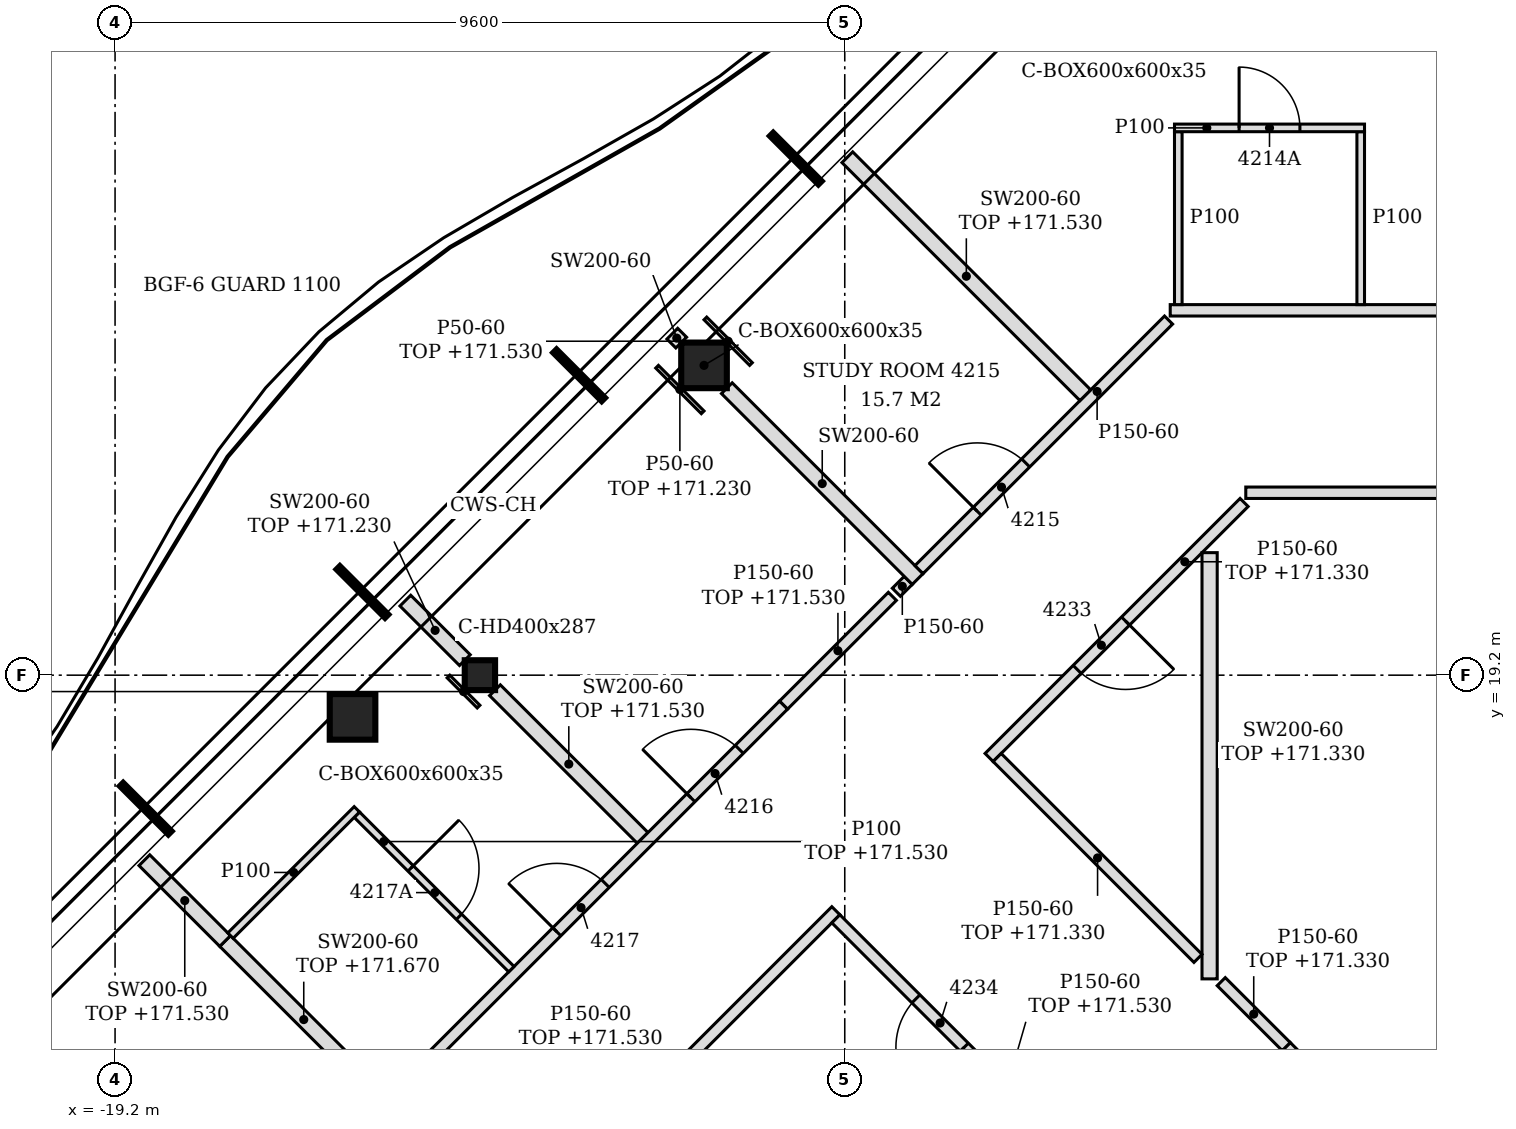
"""IFC4 building model, lengths in metres.
Left out: names, types, materials, properties, quantities, classifications, styles, units other than length and angle.
Written with IfcOpenShell. Run it as: python <this file> out.ifc"""

import sys

from ifc_helpers import new_model, si_unit, direction, frame, frame_2d, origin, origin_2d, place, context, subcontext, project, spatial, polyline, rectangle, hollow_rectangle, i_section, outline, extrude, clip, halfspace, element, fill, save


model = new_model("IFC4")
c1 = context("Model", 3, precision=1e-05, world=origin(), true_north=direction((0.0, 1.0)))
c2 = subcontext(c1, "Body", "Model", "MODEL_VIEW")
j1 = project(units=[si_unit("LENGTHUNIT", "METRE"), si_unit("PLANEANGLEUNIT", "RADIAN")], contexts=[c1])
p1 = place(None, origin())
s1 = spatial("IfcSite", under=j1, at=p1, CompositionType="ELEMENT")
p2 = place(p1, origin())
s2 = spatial("IfcBuilding", under=s1, at=p2, CompositionType="ELEMENT")
p3 = place(p2, frame((0.0, 0.0, 168.6)))
s3 = spatial("IfcBuildingStorey", under=s2, at=p3, CompositionType="ELEMENT", Elevation=168.6)
for number, where, z_axis, x_axis in (
    (1, (-11.451, 23.276, -0.15), (0.0, 0.0, 1.0), (1.0, 0.0, 0.0)),
    (2, (-16.076, 18.652, -0.15), (0.0, 0.0, 1.0), (1.0, 0.0, 0.0)),
):
    element("IfcColumn", number, at=place(p3, frame(where, z_axis=z_axis, x_axis=x_axis)), inside=s3, PredefinedType="COLUMN", context=c2, shape_type="Clipping", body=[
        clip(extrude(hollow_rectangle(XDim=0.6, YDim=0.6, WallThickness=0.035, at=origin_2d()), origin(), (0.0, 0.0, 1.0), 3.6), halfspace(frame((0.0, 0.0, 3.589), z_axis=(0.0, 0.0, 1.0), x_axis=(1.0, 0.0, 0.0)), False)),
    ])
p4 = place(p3, frame((-14.4, 19.2, -0.15), z_axis=(0.0, 0.0, 1.0), x_axis=(1.0, 0.0, 0.0)))
e3 = element("IfcColumn", 3, at=p4, inside=s3, PredefinedType="COLUMN", context=c2, shape_type="SweptSolid", body=[
    extrude(i_section(OverallWidth=0.399, OverallDepth=0.393, WebThickness=0.023, FlangeThickness=0.037, FilletRadius=0.015, at=origin_2d()), origin(), (0.0, 0.0, 1.0), 3.6),
])
p5 = place(p3, frame((-14.475, 11.343, 0.0), z_axis=(0.0, 0.0, 1.0), x_axis=(0.707124921665, 0.707088640243, 0.0)))
e4 = element("IfcWall", 4, at=p5, inside=s3, PredefinedType="PARTITIONING", context=c2, shape_type="SweptSolid", body=[
    extrude(rectangle(XDim=6.729, YDim=0.15, at=frame_2d((3.365, 0.0))), origin(), (0.0, 0.0, 1.0), 2.93),
])
p6 = place(p3, frame((-16.875, 12.337, 0.0), z_axis=(0.0, 0.0, 1.0), x_axis=(0.707106781187, 0.707106781187, 0.0)))
e5 = element("IfcWall", 5, at=p6, inside=s3, PredefinedType="PARTITIONING", context=c2, shape_type="SweptSolid", body=[
    extrude(rectangle(XDim=9.148, YDim=0.15, at=frame_2d((4.574, 0.0))), origin(), (0.0, 0.0, 1.0), 2.93),
])
p7 = place(p6, frame((7.426, 0.0, 0.0)))
e6 = element("IfcOpeningElement", 6, at=p7, cuts=e5, PredefinedType="OPENING", context=c2, shape_type="SweptSolid", body=[
    extrude(rectangle(XDim=0.9, YDim=2.1, at=frame_2d((0.45, 1.05))), frame((0.0, 0.085, 0.0), z_axis=(0.0, -1.0, 0.0), x_axis=(1.0, 0.0, 0.0)), (0.0, 0.0, 1.0), 0.17),
])
p8 = place(p6, frame((4.932, 0.0, 0.0)))
e7 = element("IfcOpeningElement", 7, at=p8, cuts=e5, PredefinedType="OPENING", context=c2, shape_type="SweptSolid", body=[
    extrude(rectangle(XDim=0.9, YDim=2.1, at=frame_2d((0.45, 1.05))), frame((0.0, 0.085, 0.0), z_axis=(0.0, -1.0, 0.0), x_axis=(1.0, 0.0, 0.0)), (0.0, 0.0, 1.0), 0.17),
])
p9 = place(p3, frame((-6.921, 13.2, 0.0), z_axis=(0.0, 0.0, 1.0), x_axis=(-0.707230271715, 0.706983269088, 0.0)))
e8 = element("IfcWall", 8, at=p9, inside=s3, PredefinedType="PARTITIONING", context=c2, shape_type="SweptSolid", body=[
    extrude(rectangle(XDim=3.954, YDim=0.15, at=frame_2d((1.977, 0.0))), origin(), (0.0, 0.0, 1.0), 2.93),
])
p10 = place(p9, frame((1.564, 0.0, 0.0)))
e9 = element("IfcOpeningElement", 9, at=p10, cuts=e8, PredefinedType="OPENING", context=c2, shape_type="SweptSolid", body=[
    extrude(rectangle(XDim=0.9, YDim=2.1, at=frame_2d((0.45, 1.05))), frame((0.0, 0.085, 0.0), z_axis=(0.0, -1.0, 0.0), x_axis=(1.0, 0.0, 0.0)), (0.0, 0.0, 1.0), 0.17),
])
p11 = place(p3, frame((-4.602, 13.398, 0.0), z_axis=(0.0, 0.0, 1.0), x_axis=(0.707106781187, 0.707106781187, 0.0)))
e10 = element("IfcWall", 10, at=p11, inside=s3, PredefinedType="PARTITIONING", context=c2, shape_type="SweptSolid", body=[
    extrude(rectangle(XDim=1.296, YDim=0.15, at=frame_2d((0.648, 0.0))), origin(), (0.0, 0.0, 1.0), 3.45),
])
p12 = place(p3, frame((-15.683, 13.635, 0.0), z_axis=(0.0, 0.0, 1.0), x_axis=(-0.707273689425, 0.706939833541, 0.0)))
e11 = element("IfcWall", 11, at=p12, inside=s3, PredefinedType="PARTITIONING", context=c2, shape_type="SweptSolid", body=[
    extrude(rectangle(XDim=2.925, YDim=0.2, at=frame_2d((1.462, 0.0))), origin(), (0.0, 0.0, 1.0), 3.07),
])
p13 = place(p3, frame((-3.792, 14.314, 0.0), z_axis=(0.0, 0.0, 1.0), x_axis=(-0.707409718716, 0.706803713817, 0.0)))
e12 = element("IfcWall", 12, at=p13, inside=s3, PredefinedType="PARTITIONING", context=c2, shape_type="SweptSolid", body=[
    extrude(rectangle(XDim=1.208, YDim=0.15, at=frame_2d((0.604, 0.0))), origin(), (0.0, 0.0, 1.0), 2.73),
])
p14 = place(p3, frame((-4.8, 15.205, 0.0), z_axis=(0.0, 0.0, 1.0), x_axis=(0.0, 1.0, 0.0)))
e13 = element("IfcWall", 13, at=p14, inside=s3, PredefinedType="PARTITIONING", context=c2, shape_type="SweptSolid", body=[
    extrude(rectangle(XDim=5.607, YDim=0.2, at=frame_2d((2.804, 0.0))), origin(), (0.0, 0.0, 1.0), 2.73),
])
p15 = place(p3, frame((-13.986, 15.332, 0.0), z_axis=(0.0, 0.0, 1.0), x_axis=(-0.707106781187, 0.707106781187, 0.0)))
e14 = element("IfcWall", 14, at=p15, inside=s3, PredefinedType="PARTITIONING", context=c2, shape_type="SweptSolid", body=[
    extrude(rectangle(XDim=2.874, YDim=0.1, at=frame_2d((1.437, 0.0))), origin(), (0.0, 0.0, 1.0), 2.93),
])
p16 = place(p15, frame((0.975, 0.0, 0.0)))
e15 = element("IfcOpeningElement", 15, at=p16, cuts=e14, PredefinedType="OPENING", context=c2, shape_type="SweptSolid", body=[
    extrude(rectangle(XDim=0.9, YDim=2.1, at=frame_2d((0.45, 1.05))), frame((0.0, 0.06, 0.0), z_axis=(0.0, -1.0, 0.0), x_axis=(1.0, 0.0, 0.0)), (0.0, 0.0, 1.0), 0.12),
])
p17 = place(p3, frame((-4.953, 15.474, 0.0), z_axis=(0.0, 0.0, 1.0), x_axis=(-0.707008778354, 0.707204770438, 0.0)))
e16 = element("IfcWall", 16, at=p17, inside=s3, PredefinedType="PARTITIONING", context=c2, shape_type="SweptSolid", body=[
    extrude(rectangle(XDim=3.737, YDim=0.15, at=frame_2d((1.869, 0.0))), origin(), (0.0, 0.0, 1.0), 2.73),
])
p18 = place(p3, frame((-17.752, 15.703, 0.0), z_axis=(0.0, 0.0, 1.0), x_axis=(-0.706863049337, 0.707350429054, 0.0)))
e17 = element("IfcWall", 17, at=p18, inside=s3, PredefinedType="PARTITIONING", context=c2, shape_type="SweptSolid", body=[
    extrude(rectangle(XDim=1.503, YDim=0.2, at=frame_2d((0.751, 0.0))), origin(), (0.0, 0.0, 1.0), 2.93),
])
p19 = place(p3, frame((-17.681, 15.774, 0.0), z_axis=(0.0, 0.0, 1.0), x_axis=(0.707314478862, 0.706899022487, 0.0)))
e18 = element("IfcWall", 18, at=p19, inside=s3, PredefinedType="PARTITIONING", context=c2, shape_type="SweptSolid", body=[
    extrude(rectangle(XDim=2.351, YDim=0.1, at=frame_2d((1.175, 0.0))), origin(), (0.0, 0.0, 1.0), 3.45),
])
p20 = place(p3, frame((-12.259, 17.059, 0.0), z_axis=(0.0, 0.0, 1.0), x_axis=(-0.707106781187, 0.707106781187, 0.0)))
e19 = element("IfcWall", 19, at=p20, inside=s3, PredefinedType="PARTITIONING", context=c2, shape_type="SweptSolid", body=[
    extrude(rectangle(XDim=2.748, YDim=0.2, at=frame_2d((1.374, 0.0))), origin(), (0.0, 0.0, 1.0), 2.93),
])
p21 = place(p3, frame((-7.701, 18.117, 0.0), z_axis=(0.0, 0.0, 1.0), x_axis=(0.707106781187, 0.707106781187, 0.0)))
e20 = element("IfcWall", 20, at=p21, inside=s3, PredefinedType="PARTITIONING", context=c2, shape_type="SweptSolid", body=[
    extrude(rectangle(XDim=4.745, YDim=0.15, at=frame_2d((2.372, 0.0))), origin(), (0.0, 0.0, 1.0), 2.73),
])
p22 = place(p21, frame((1.639, 0.0, 0.0)))
e21 = element("IfcOpeningElement", 21, at=p22, cuts=e20, PredefinedType="OPENING", context=c2, shape_type="SweptSolid", body=[
    extrude(rectangle(XDim=0.9, YDim=2.1, at=frame_2d((0.45, 1.05))), frame((0.0, 0.085, 0.0), z_axis=(0.0, -1.0, 0.0), x_axis=(1.0, 0.0, 0.0)), (0.0, 0.0, 1.0), 0.17),
])
p23 = place(p3, frame((-10.406, 18.806, 0.0), z_axis=(0.0, 0.0, 1.0), x_axis=(0.707408152147, 0.706805281726, 0.0)))
e22 = element("IfcWall", 22, at=p23, inside=s3, PredefinedType="PARTITIONING", context=c2, shape_type="SweptSolid", body=[
    extrude(rectangle(XDim=2.025, YDim=0.15, at=frame_2d((1.012, 0.0))), origin(), (0.0, 0.0, 1.0), 2.93),
])
p24 = place(p3, frame((-14.598, 19.398, 0.0), z_axis=(0.0, 0.0, 1.0), x_axis=(-0.707106781187, 0.707106781187, 0.0)))
e23 = element("IfcWall", 23, at=p24, inside=s3, PredefinedType="PARTITIONING", context=c2, shape_type="SweptSolid", body=[
    extrude(rectangle(XDim=1.107, YDim=0.2, at=frame_2d((0.554, 0.0))), origin(), (0.0, 0.0, 1.0), 2.63),
])
p25 = place(p3, frame((-8.921, 20.291, 0.0), z_axis=(0.0, 0.0, 1.0), x_axis=(0.706555431121, 0.707657701684, 0.0)))
e24 = element("IfcWall", 24, at=p25, inside=s3, PredefinedType="PARTITIONING", context=c2, shape_type="SweptSolid", body=[
    extrude(rectangle(XDim=0.221, YDim=0.15, at=frame_2d((0.111, 0.0))), origin(), (0.0, 0.0, 1.0), 3.45),
])
p26 = place(p3, frame((-8.641, 20.465, 0.0), z_axis=(0.0, 0.0, 1.0), x_axis=(-0.707106781187, 0.707106781187, 0.0)))
e25 = element("IfcWall", 25, at=p26, inside=s3, PredefinedType="PARTITIONING", context=c2, shape_type="SweptSolid", body=[
    extrude(rectangle(XDim=3.55, YDim=0.2, at=frame_2d((1.775, 0.0))), origin(), (0.0, 0.0, 1.0), 3.45),
])
p27 = place(p3, frame((-8.623, 20.589, 0.0), z_axis=(0.0, 0.0, 1.0), x_axis=(0.707106781187, 0.707106781187, 0.0)))
e26 = element("IfcWall", 26, at=p27, inside=s3, PredefinedType="PARTITIONING", context=c2, shape_type="SweptSolid", body=[
    extrude(rectangle(XDim=4.643, YDim=0.15, at=frame_2d((2.322, 0.0))), origin(), (0.0, 0.0, 1.0), 3.45),
])
p28 = place(p27, frame((1.085, 0.0, 0.0)))
e27 = element("IfcOpeningElement", 27, at=p28, cuts=e26, PredefinedType="OPENING", context=c2, shape_type="SweptSolid", body=[
    extrude(rectangle(XDim=0.9, YDim=2.1, at=frame_2d((0.45, 1.05))), frame((0.0, 0.085, 0.0), z_axis=(0.0, -1.0, 0.0), x_axis=(1.0, 0.0, 0.0)), (0.0, 0.0, 1.0), 0.17),
])
p29 = place(p3, frame((-4.324, 21.6, 0.0), z_axis=(0.0, 0.0, 1.0), x_axis=(1.0, 0.0, 0.0)))
e28 = element("IfcWall", 28, at=p29, inside=s3, PredefinedType="PARTITIONING", context=c2, shape_type="SweptSolid", body=[
    extrude(rectangle(XDim=9.199, YDim=0.15, at=frame_2d((4.6, 0.0))), origin(), (0.0, 0.0, 1.0), 3.45),
])
p30 = place(p3, frame((-6.435, 22.883, 0.0), z_axis=(0.0, 0.0, 1.0), x_axis=(-0.707106781187, 0.707106781187, 0.0)))
e29 = element("IfcWall", 29, at=p30, inside=s3, PredefinedType="PARTITIONING", context=c2, shape_type="SweptSolid", body=[
    extrude(rectangle(XDim=4.428, YDim=0.2, at=frame_2d((2.214, 0.0))), origin(), (0.0, 0.0, 1.0), 2.93),
])
p31 = place(p3, frame((-11.752, 23.576, 0.0), z_axis=(0.0, 0.0, 1.0), x_axis=(-0.707106781187, 0.707106781187, 0.0)))
e30 = element("IfcWall", 30, at=p31, inside=s3, PredefinedType="PARTITIONING", context=c2, shape_type="SweptSolid", body=[
    extrude(rectangle(XDim=0.166, YDim=0.2, at=frame_2d((0.083, 0.0))), origin(), (0.0, 0.0, 1.0), 3.45),
])
p32 = place(p3, frame((-5.318, 24.0, 0.0), z_axis=(0.0, 0.0, 1.0), x_axis=(1.0, 0.0, 0.0)))
e31 = element("IfcWall", 31, at=p32, inside=s3, PredefinedType="PARTITIONING", context=c2, shape_type="SweptSolid", body=[
    extrude(outline(polyline([(0.0, 0.0), (25.036, 0.0), (25.036, 2.88), (24.668, 2.88), (24.666, 2.73), (24.368, 2.73), (24.366, 2.88), (12.668, 2.88), (12.666, 2.73), (12.368, 2.73), (12.366, 2.88), (0.668, 2.88), (0.666, 2.73), (0.368, 2.73), (0.366, 2.88), (0.0, 2.88), (0.0, 0.0)])), frame((0.0, 0.075, 0.0), z_axis=(0.0, -1.0, 0.0), x_axis=(1.0, 0.0, 0.0)), (0.0, 0.0, 1.0), 0.15),
])
p33 = place(p32, frame((21.812, 0.0, 0.0)))
e32 = element("IfcOpeningElement", 32, at=p33, cuts=e31, PredefinedType="OPENING", context=c2, shape_type="SweptSolid", body=[
    extrude(rectangle(XDim=0.9, YDim=2.1, at=frame_2d((0.45, 1.05))), frame((0.0, 0.085, 0.0), z_axis=(0.0, -1.0, 0.0), x_axis=(1.0, 0.0, 0.0)), (0.0, 0.0, 1.0), 0.17),
])
p34 = place(p32, frame((13.268, 0.0, 0.0)))
e33 = element("IfcOpeningElement", 33, at=p34, cuts=e31, PredefinedType="OPENING", context=c2, shape_type="SweptSolid", body=[
    extrude(rectangle(XDim=0.9, YDim=2.1, at=frame_2d((0.45, 1.05))), frame((0.0, 0.085, 0.0), z_axis=(0.0, -1.0, 0.0), x_axis=(1.0, 0.0, 0.0)), (0.0, 0.0, 1.0), 0.17),
])
p35 = place(p32, frame((4.724, 0.0, 0.0)))
e34 = element("IfcOpeningElement", 34, at=p35, cuts=e31, PredefinedType="OPENING", context=c2, shape_type="SweptSolid", body=[
    extrude(rectangle(XDim=0.9, YDim=2.1, at=frame_2d((0.45, 1.05))), frame((0.0, 0.085, 0.0), z_axis=(0.0, -1.0, 0.0), x_axis=(1.0, 0.0, 0.0)), (0.0, 0.0, 1.0), 0.17),
])
p36 = place(p3, frame((-5.212, 24.075, 0.0), z_axis=(0.0, 0.0, 1.0), x_axis=(0.0, 1.0, 0.0)))
e35 = element("IfcWall", 35, at=p36, inside=s3, PredefinedType="PARTITIONING", context=c2, shape_type="SweptSolid", body=[
    extrude(outline(polyline([(0.0, 0.0), (2.275, 0.0), (2.275, 3.45), (0.01, 3.45), (0.008, 3.07), (0.0, 3.07), (0.0, 0.0)])), frame((0.0, 0.05, 0.0), z_axis=(0.0, -1.0, 0.0), x_axis=(1.0, 0.0, 0.0)), (0.0, 0.0, 1.0), 0.1),
])
p37 = place(p3, frame((-2.812, 24.075, 0.0), z_axis=(0.0, 0.0, 1.0), x_axis=(0.0, 1.0, 0.0)))
e36 = element("IfcWall", 36, at=p37, inside=s3, PredefinedType="PARTITIONING", context=c2, shape_type="SweptSolid", body=[
    extrude(outline(polyline([(0.0, 0.0), (2.275, 0.0), (2.275, 3.45), (0.03, 3.45), (0.028, 2.88), (0.0, 2.88), (0.0, 0.0)])), frame((0.0, 0.05, 0.0), z_axis=(0.0, -1.0, 0.0), x_axis=(1.0, 0.0, 0.0)), (0.0, 0.0, 1.0), 0.1),
])
p38 = place(p3, frame((-5.262, 26.4, 0.0), z_axis=(0.0, 0.0, 1.0), x_axis=(1.0, 0.0, 0.0)))
e37 = element("IfcWall", 37, at=p38, inside=s3, PredefinedType="PARTITIONING", context=c2, shape_type="SweptSolid", body=[
    extrude(outline(polyline([(0.0, 0.0), (2.5, 0.0), (2.5, 3.45), (0.612, 3.45), (0.61, 2.73), (0.312, 2.73), (0.31, 3.45), (0.0, 3.45), (0.0, 0.0)])), frame((0.0, 0.05, 0.0), z_axis=(0.0, -1.0, 0.0), x_axis=(1.0, 0.0, 0.0)), (0.0, 0.0, 1.0), 0.1),
])
p39 = place(p38, frame((0.85, 0.0, 0.0)))
e38 = element("IfcOpeningElement", 38, at=p39, cuts=e37, PredefinedType="OPENING", context=c2, shape_type="SweptSolid", body=[
    extrude(rectangle(XDim=0.8, YDim=2.1, at=frame_2d((0.4, 1.05))), frame((0.0, 0.06, 0.0), z_axis=(0.0, -1.0, 0.0), x_axis=(1.0, 0.0, 0.0)), (0.0, 0.0, 1.0), 0.12),
])
p40 = place(p3, frame((-14.418, 18.786, 0.0), z_axis=(0.0, 0.0, 1.0), x_axis=(-0.707106781187, 0.707106781187, 0.0)))
e39 = element("IfcWall", 39, at=p40, inside=s3, PredefinedType="PARTITIONING", context=c2, shape_type="SweptSolid", body=[
    extrude(rectangle(XDim=0.56, YDim=0.05, at=frame_2d((0.28, 0.0))), origin(), (0.0, 0.0, 1.0), 2.93),
])
p41 = place(p3, frame((-11.469, 22.658, 0.0), z_axis=(0.0, 0.0, 1.0), x_axis=(-0.706962899457, 0.707250633645, 0.0)))
e40 = element("IfcWall", 40, at=p41, inside=s3, PredefinedType="PARTITIONING", context=c2, shape_type="SweptSolid", body=[
    extrude(rectangle(XDim=0.848, YDim=0.05, at=frame_2d((0.424, 0.0))), origin(), (0.0, 0.0, 1.0), 2.63),
])
p42 = place(p3, frame((-10.834, 23.293, 0.0), z_axis=(0.0, 0.0, 1.0), x_axis=(-0.707250633645, 0.706962899457, 0.0)))
e41 = element("IfcWall", 41, at=p42, inside=s3, PredefinedType="PARTITIONING", context=c2, shape_type="SweptSolid", body=[
    extrude(rectangle(XDim=0.848, YDim=0.05, at=frame_2d((0.424, 0.0))), origin(), (0.0, 0.0, 1.0), 2.93),
])
p43 = place(p39, origin())
e42 = element("IfcDoor", 42, at=p43, inside=s3, OperationType="SINGLE_SWING_LEFT", PredefinedType="DOOR", context=c2, shape_type="SweptSolid", body=[
    extrude(rectangle(XDim=0.8, YDim=2.1, at=frame_2d((0.4, 1.05))), frame((0.0, 0.025, 0.0), z_axis=(0.0, -1.0, 0.0), x_axis=(1.0, 0.0, 0.0)), (0.0, 0.0, 1.0), 0.05),
])
fill(e38, e42)
p44 = place(p28, origin())
e43 = element("IfcDoor", 43, at=p44, inside=s3, OperationType="SINGLE_SWING_LEFT", PredefinedType="DOOR", context=c2, shape_type="SweptSolid", body=[
    extrude(rectangle(XDim=0.9, YDim=2.1, at=frame_2d((0.45, 1.05))), frame((0.0, 0.025, 0.0), z_axis=(0.0, -1.0, 0.0), x_axis=(1.0, 0.0, 0.0)), (0.0, 0.0, 1.0), 0.05),
])
fill(e27, e43)
p45 = place(p7, origin())
e44 = element("IfcDoor", 44, at=p45, inside=s3, OperationType="SINGLE_SWING_LEFT", PredefinedType="DOOR", context=c2, shape_type="SweptSolid", body=[
    extrude(rectangle(XDim=0.9, YDim=2.1, at=frame_2d((0.45, 1.05))), frame((0.0, 0.025, 0.0), z_axis=(0.0, -1.0, 0.0), x_axis=(1.0, 0.0, 0.0)), (0.0, 0.0, 1.0), 0.05),
])
fill(e6, e44)
p46 = place(p8, origin())
e45 = element("IfcDoor", 45, at=p46, inside=s3, OperationType="SINGLE_SWING_LEFT", PredefinedType="DOOR", context=c2, shape_type="SweptSolid", body=[
    extrude(rectangle(XDim=0.9, YDim=2.1, at=frame_2d((0.45, 1.05))), frame((0.0, 0.025, 0.0), z_axis=(0.0, -1.0, 0.0), x_axis=(1.0, 0.0, 0.0)), (0.0, 0.0, 1.0), 0.05),
])
fill(e7, e45)
p47 = place(p16, frame((0.9, 0.0, 0.0), z_axis=(0.0, 0.0, 1.0), x_axis=(-1.0, 0.0, 0.0)))
e46 = element("IfcDoor", 46, at=p47, inside=s3, OperationType="SINGLE_SWING_LEFT", PredefinedType="DOOR", context=c2, shape_type="SweptSolid", body=[
    extrude(rectangle(XDim=0.9, YDim=2.1, at=frame_2d((0.45, 1.05))), frame((0.0, 0.025, 0.0), z_axis=(0.0, -1.0, 0.0), x_axis=(1.0, 0.0, 0.0)), (0.0, 0.0, 1.0), 0.05),
])
fill(e15, e46)
p48 = place(p22, frame((0.9, 0.0, 0.0), z_axis=(0.0, 0.0, 1.0), x_axis=(-1.0, 0.0, 0.0)))
e47 = element("IfcDoor", 47, at=p48, inside=s3, OperationType="SINGLE_SWING_LEFT", PredefinedType="DOOR", context=c2, shape_type="SweptSolid", body=[
    extrude(rectangle(XDim=0.9, YDim=2.1, at=frame_2d((0.45, 1.05))), frame((0.0, 0.025, 0.0), z_axis=(0.0, -1.0, 0.0), x_axis=(1.0, 0.0, 0.0)), (0.0, 0.0, 1.0), 0.05),
])
fill(e21, e47)
p49 = place(p10, origin())
e48 = element("IfcDoor", 48, at=p49, inside=s3, OperationType="SINGLE_SWING_LEFT", PredefinedType="DOOR", context=c2, shape_type="SweptSolid", body=[
    extrude(rectangle(XDim=0.9, YDim=2.1, at=frame_2d((0.45, 1.05))), frame((0.0, 0.025, 0.0), z_axis=(0.0, -1.0, 0.0), x_axis=(1.0, 0.0, 0.0)), (0.0, 0.0, 1.0), 0.05),
])
fill(e9, e48)
save(model, sys.argv[1])
